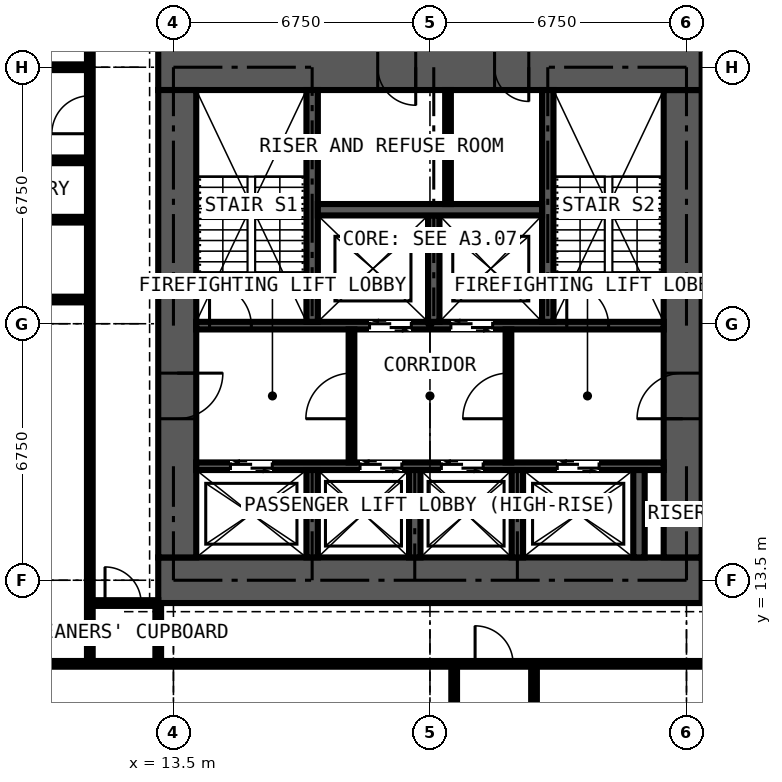
"""IFC4 building model, lengths in metres.
Left out: names, types, materials, properties, quantities, classifications, styles, units other than length and angle.
Written with IfcOpenShell. Run it as: python <this file> out.ifc"""

import sys

from ifc_helpers import new_model, si_unit, direction, frame, frame_2d, origin, place, context, subcontext, project, spatial, rectangle, extrude, element, fill, save


model = new_model("IFC4")
c1 = context("Model", 3, precision=1e-05, world=origin(), true_north=direction((0.0, 1.0)))
c2 = subcontext(c1, "Body", "Model", "MODEL_VIEW")
j1 = project(units=[si_unit("LENGTHUNIT", "METRE"), si_unit("PLANEANGLEUNIT", "RADIAN")], contexts=[c1])
p1 = place(None, origin())
s1 = spatial("IfcSite", under=j1, at=p1, CompositionType="ELEMENT")
p2 = place(p1, origin())
s2 = spatial("IfcBuilding", under=s1, at=p2, CompositionType="ELEMENT")
p3 = place(p2, frame((0.0, 0.0, 171.0)))
s3 = spatial("IfcBuildingStorey", under=s2, at=p3, CompositionType="ELEMENT", Elevation=171.0)
p4 = place(p3, frame((13.1, 13.5, 0.0), z_axis=(0.0, 0.0, 1.0), x_axis=(1.0, 0.0, 0.0)))
e1 = element("IfcWall", 1, at=p4, inside=s3, PredefinedType="SHEAR", context=c2, shape_type="SweptSolid", body=[
    extrude(rectangle(XDim=14.3, YDim=1.2, at=frame_2d((7.15, 0.0))), origin(), (0.0, 0.0, 1.0), 3.6),
])
p5 = place(p3, frame((26.9, 14.1, 0.0), z_axis=(0.0, 0.0, 1.0), x_axis=(0.0, 1.0, 0.0)))
e2 = element("IfcWall", 2, at=p5, inside=s3, PredefinedType="SHEAR", context=c2, shape_type="SweptSolid", body=[
    extrude(rectangle(XDim=12.3, YDim=1.0, at=frame_2d((6.15, 0.0))), origin(), (0.0, 0.0, 1.0), 3.6),
])
p6 = place(p5, frame((3.65, 0.0, 0.0)))
e3 = element("IfcOpeningElement", 3, at=p6, cuts=e2, PredefinedType="OPENING", context=c2, shape_type="SweptSolid", body=[
    extrude(rectangle(XDim=1.2, YDim=2.2, at=frame_2d((0.6, 1.1))), frame((0.0, 0.51, 0.0), z_axis=(0.0, -1.0, 0.0), x_axis=(1.0, 0.0, 0.0)), (0.0, 0.0, 1.0), 1.02),
])
p7 = place(p3, frame((27.4, 27.0, 0.0), z_axis=(0.0, 0.0, 1.0), x_axis=(-1.0, 0.0, 0.0)))
e4 = element("IfcWall", 4, at=p7, inside=s3, PredefinedType="SHEAR", context=c2, shape_type="SweptSolid", body=[
    extrude(rectangle(XDim=14.3, YDim=1.2, at=frame_2d((7.15, 0.0))), origin(), (0.0, 0.0, 1.0), 3.6),
])
p8 = place(p7, frame((4.55, 0.0, 0.0)))
e5 = element("IfcOpeningElement", 5, at=p8, cuts=e4, PredefinedType="OPENING", context=c2, shape_type="SweptSolid", body=[
    extrude(rectangle(XDim=0.9, YDim=2.2, at=frame_2d((0.45, 1.1))), frame((0.0, 0.61, 0.0), z_axis=(0.0, -1.0, 0.0), x_axis=(1.0, 0.0, 0.0)), (0.0, 0.0, 1.0), 1.22),
])
p9 = place(p7, frame((7.525, 0.0, 0.0)))
e6 = element("IfcOpeningElement", 6, at=p9, cuts=e4, PredefinedType="OPENING", context=c2, shape_type="SweptSolid", body=[
    extrude(rectangle(XDim=1.0, YDim=2.2, at=frame_2d((0.5, 1.1))), frame((0.0, 0.61, 0.0), z_axis=(0.0, -1.0, 0.0), x_axis=(1.0, 0.0, 0.0)), (0.0, 0.0, 1.0), 1.22),
])
p10 = place(p3, frame((13.6, 26.4, 0.0), z_axis=(0.0, 0.0, 1.0), x_axis=(0.0, -1.0, 0.0)))
e7 = element("IfcWall", 7, at=p10, inside=s3, PredefinedType="SHEAR", context=c2, shape_type="SweptSolid", body=[
    extrude(rectangle(XDim=12.3, YDim=1.0, at=frame_2d((6.15, 0.0))), origin(), (0.0, 0.0, 1.0), 3.6),
])
p11 = place(p10, frame((7.45, 0.0, 0.0)))
e8 = element("IfcOpeningElement", 8, at=p11, cuts=e7, PredefinedType="OPENING", context=c2, shape_type="SweptSolid", body=[
    extrude(rectangle(XDim=1.2, YDim=2.2, at=frame_2d((0.6, 1.1))), frame((0.0, 0.51, 0.0), z_axis=(0.0, -1.0, 0.0), x_axis=(1.0, 0.0, 0.0)), (0.0, 0.0, 1.0), 1.02),
])
p12 = place(p3, frame((14.1, 16.5, 0.0), z_axis=(0.0, 0.0, 1.0), x_axis=(1.0, 0.0, 0.0)))
e9 = element("IfcWall", 9, at=p12, inside=s3, PredefinedType="SHEAR", context=c2, shape_type="SweptSolid", body=[
    extrude(rectangle(XDim=12.3, YDim=0.2, at=frame_2d((6.15, 0.0))), origin(), (0.0, 0.0, 1.0), 3.6),
])
p13 = place(p12, frame((0.9, 0.0, 0.0)))
e10 = element("IfcOpeningElement", 10, at=p13, cuts=e9, PredefinedType="OPENING", context=c2, shape_type="SweptSolid", body=[
    extrude(rectangle(XDim=1.1, YDim=2.2, at=frame_2d((0.55, 1.1))), frame((0.0, 0.11, 0.0), z_axis=(0.0, -1.0, 0.0), x_axis=(1.0, 0.0, 0.0)), (0.0, 0.0, 1.0), 0.22),
])
p14 = place(p12, frame((4.31, 0.0, 0.0)))
e11 = element("IfcOpeningElement", 11, at=p14, cuts=e9, PredefinedType="OPENING", context=c2, shape_type="SweptSolid", body=[
    extrude(rectangle(XDim=1.1, YDim=2.2, at=frame_2d((0.55, 1.1))), frame((0.0, 0.11, 0.0), z_axis=(0.0, -1.0, 0.0), x_axis=(1.0, 0.0, 0.0)), (0.0, 0.0, 1.0), 0.22),
])
p15 = place(p12, frame((6.45, 0.0, 0.0)))
e12 = element("IfcOpeningElement", 12, at=p15, cuts=e9, PredefinedType="OPENING", context=c2, shape_type="SweptSolid", body=[
    extrude(rectangle(XDim=1.1, YDim=2.2, at=frame_2d((0.55, 1.1))), frame((0.0, 0.11, 0.0), z_axis=(0.0, -1.0, 0.0), x_axis=(1.0, 0.0, 0.0)), (0.0, 0.0, 1.0), 0.22),
])
p16 = place(p12, frame((9.5, 0.0, 0.0)))
e13 = element("IfcOpeningElement", 13, at=p16, cuts=e9, PredefinedType="OPENING", context=c2, shape_type="SweptSolid", body=[
    extrude(rectangle(XDim=1.1, YDim=2.2, at=frame_2d((0.55, 1.1))), frame((0.0, 0.11, 0.0), z_axis=(0.0, -1.0, 0.0), x_axis=(1.0, 0.0, 0.0)), (0.0, 0.0, 1.0), 0.22),
])
p17 = place(p3, frame((14.1, 20.2, 0.0), z_axis=(0.0, 0.0, 1.0), x_axis=(1.0, 0.0, 0.0)))
e14 = element("IfcWall", 14, at=p17, inside=s3, PredefinedType="SHEAR", context=c2, shape_type="SweptSolid", body=[
    extrude(rectangle(XDim=12.3, YDim=0.2, at=frame_2d((6.15, 0.0))), origin(), (0.0, 0.0, 1.0), 3.6),
])
p18 = place(p17, frame((4.56, 0.0, 0.0)))
e15 = element("IfcOpeningElement", 15, at=p18, cuts=e14, PredefinedType="OPENING", context=c2, shape_type="SweptSolid", body=[
    extrude(rectangle(XDim=1.1, YDim=2.2, at=frame_2d((0.55, 1.1))), frame((0.0, 0.11, 0.0), z_axis=(0.0, -1.0, 0.0), x_axis=(1.0, 0.0, 0.0)), (0.0, 0.0, 1.0), 0.22),
])
p19 = place(p17, frame((6.7, 0.0, 0.0)))
e16 = element("IfcOpeningElement", 16, at=p19, cuts=e14, PredefinedType="OPENING", context=c2, shape_type="SweptSolid", body=[
    extrude(rectangle(XDim=1.1, YDim=2.2, at=frame_2d((0.55, 1.1))), frame((0.0, 0.11, 0.0), z_axis=(0.0, -1.0, 0.0), x_axis=(1.0, 0.0, 0.0)), (0.0, 0.0, 1.0), 0.22),
])
p20 = place(p17, frame((0.35, 0.0, 0.0)))
e17 = element("IfcOpeningElement", 17, at=p20, cuts=e14, PredefinedType="OPENING", context=c2, shape_type="SweptSolid", body=[
    extrude(rectangle(XDim=1.1, YDim=2.2, at=frame_2d((0.55, 1.1))), frame((0.0, 0.11, 0.0), z_axis=(0.0, -1.0, 0.0), x_axis=(1.0, 0.0, 0.0)), (0.0, 0.0, 1.0), 0.22),
])
p21 = place(p17, frame((9.75, 0.0, 0.0)))
e18 = element("IfcOpeningElement", 18, at=p21, cuts=e14, PredefinedType="OPENING", context=c2, shape_type="SweptSolid", body=[
    extrude(rectangle(XDim=1.1, YDim=2.2, at=frame_2d((0.55, 1.1))), frame((0.0, 0.11, 0.0), z_axis=(0.0, -1.0, 0.0), x_axis=(1.0, 0.0, 0.0)), (0.0, 0.0, 1.0), 0.22),
])
for number, where, z_axis, x_axis in (
    (19, (17.15, 20.3, 0.0), (0.0, 0.0, 1.0), (0.0, 1.0, 0.0)),
    (20, (23.35, 20.3, 0.0), (0.0, 0.0, 1.0), (0.0, 1.0, 0.0)),
):
    element("IfcWall", number, at=place(p3, frame(where, z_axis=z_axis, x_axis=x_axis)), inside=s3, PredefinedType="SHEAR", context=c2, shape_type="SweptSolid", body=[
        extrude(rectangle(XDim=6.1, YDim=0.3, at=frame_2d((3.05, 0.0))), origin(), (0.0, 0.0, 1.0), 3.6),
    ])
p22 = place(p3, frame((20.35, 20.3, 0.0), z_axis=(0.0, 0.0, 1.0), x_axis=(0.0, 1.0, 0.0)))
e21 = element("IfcWall", 21, at=p22, inside=s3, PredefinedType="SHEAR", context=c2, shape_type="SweptSolid", body=[
    extrude(rectangle(XDim=2.8, YDim=0.3, at=frame_2d((1.4, 0.0))), origin(), (0.0, 0.0, 1.0), 3.6),
])
p23 = place(p3, frame((17.3, 23.25, 0.0), z_axis=(0.0, 0.0, 1.0), x_axis=(1.0, 0.0, 0.0)))
e22 = element("IfcWall", 22, at=p23, inside=s3, PredefinedType="SHEAR", context=c2, shape_type="SweptSolid", body=[
    extrude(rectangle(XDim=5.9, YDim=0.3, at=frame_2d((2.95, 0.0))), origin(), (0.0, 0.0, 1.0), 3.6),
])
for number, where, z_axis, x_axis in (
    (23, (17.15, 14.1, 0.0), (0.0, 0.0, 1.0), (0.0, 1.0, 0.0)),
    (24, (19.85, 14.1, 0.0), (0.0, 0.0, 1.0), (0.0, 1.0, 0.0)),
    (25, (22.55, 14.1, 0.0), (0.0, 0.0, 1.0), (0.0, 1.0, 0.0)),
    (26, (25.75, 14.1, 0.0), (0.0, 0.0, 1.0), (0.0, 1.0, 0.0)),
):
    element("IfcWall", number, at=place(p3, frame(where, z_axis=z_axis, x_axis=x_axis)), inside=s3, PredefinedType="SHEAR", context=c2, shape_type="SweptSolid", body=[
        extrude(rectangle(XDim=2.3, YDim=0.3, at=frame_2d((1.15, 0.0))), origin(), (0.0, 0.0, 1.0), 3.6),
    ])
p24 = place(p3, frame((18.185, 16.6, 0.0), z_axis=(0.0, 0.0, 1.0), x_axis=(0.0, 1.0, 0.0)))
e27 = element("IfcWall", 27, at=p24, inside=s3, PredefinedType="PARTITIONING", context=c2, shape_type="SweptSolid", body=[
    extrude(rectangle(XDim=3.5, YDim=0.15, at=frame_2d((1.75, 0.0))), origin(), (0.0, 0.0, 1.0), 3.375),
])
p25 = place(p24, frame((1.15, 0.0, 0.0)))
e28 = element("IfcOpeningElement", 28, at=p25, cuts=e27, PredefinedType="OPENING", context=c2, shape_type="SweptSolid", body=[
    extrude(rectangle(XDim=1.2, YDim=2.2, at=frame_2d((0.6, 1.1))), frame((0.0, 0.085, 0.0), z_axis=(0.0, -1.0, 0.0), x_axis=(1.0, 0.0, 0.0)), (0.0, 0.0, 1.0), 0.17),
])
p26 = place(p3, frame((22.315, 16.6, 0.0), z_axis=(0.0, 0.0, 1.0), x_axis=(0.0, 1.0, 0.0)))
e29 = element("IfcWall", 29, at=p26, inside=s3, PredefinedType="PARTITIONING", context=c2, shape_type="SweptSolid", body=[
    extrude(rectangle(XDim=3.5, YDim=0.15, at=frame_2d((1.75, 0.0))), origin(), (0.0, 0.0, 1.0), 3.375),
])
p27 = place(p26, frame((1.15, 0.0, 0.0)))
e30 = element("IfcOpeningElement", 30, at=p27, cuts=e29, PredefinedType="OPENING", context=c2, shape_type="SweptSolid", body=[
    extrude(rectangle(XDim=1.2, YDim=2.2, at=frame_2d((0.6, 1.1))), frame((0.0, 0.085, 0.0), z_axis=(0.0, -1.0, 0.0), x_axis=(1.0, 0.0, 0.0)), (0.0, 0.0, 1.0), 0.17),
])
p28 = place(p3, frame((20.725, 23.4, 0.0), z_axis=(0.0, 0.0, 1.0), x_axis=(0.0, 1.0, 0.0)))
e31 = element("IfcWall", 31, at=p28, inside=s3, PredefinedType="PARTITIONING", context=c2, shape_type="SweptSolid", body=[
    extrude(rectangle(XDim=3.0, YDim=0.15, at=frame_2d((1.5, 0.0))), origin(), (0.0, 0.0, 1.0), 3.375),
])
p29 = place(p3, frame((-0.734, 27.0, 0.0), z_axis=(0.0, 0.0, 1.0), x_axis=(1.0, 0.0, 0.0)))
e32 = element("IfcWall", 32, at=p29, inside=s3, PredefinedType="PARTITIONING", context=c2, shape_type="SweptSolid", body=[
    extrude(rectangle(XDim=12.034, YDim=0.15, at=frame_2d((6.017, 0.0))), origin(), (0.0, 0.0, 1.0), 2.806),
])
p30 = place(p29, frame((8.084, 0.0, 0.0)))
e33 = element("IfcOpeningElement", 33, at=p30, cuts=e32, PredefinedType="OPENING", context=c2, shape_type="SweptSolid", body=[
    extrude(rectangle(XDim=1.0, YDim=2.2, at=frame_2d((0.5, 1.1))), frame((0.0, 0.085, 0.0), z_axis=(0.0, -1.0, 0.0), x_axis=(1.0, 0.0, 0.0)), (0.0, 0.0, 1.0), 0.17),
])
p31 = place(p3, frame((5.65, 20.887, 0.0), z_axis=(0.0, 0.0, 1.0), x_axis=(1.0, 0.0, 0.0)))
e34 = element("IfcWall", 34, at=p31, inside=s3, PredefinedType="PARTITIONING", context=c2, shape_type="SweptSolid", body=[
    extrude(rectangle(XDim=5.65, YDim=0.15, at=frame_2d((2.825, 0.0))), origin(), (0.0, 0.0, 1.0), 3.375),
])
p32 = place(p3, frame((5.65, 22.988, 0.0), z_axis=(0.0, 0.0, 1.0), x_axis=(1.0, 0.0, 0.0)))
e35 = element("IfcWall", 35, at=p32, inside=s3, PredefinedType="PARTITIONING", context=c2, shape_type="SweptSolid", body=[
    extrude(rectangle(XDim=5.65, YDim=0.15, at=frame_2d((2.825, 0.0))), origin(), (0.0, 0.0, 1.0), 3.375),
])
p33 = place(p32, frame((2.35, 0.0, 0.0)))
e36 = element("IfcOpeningElement", 36, at=p33, cuts=e35, PredefinedType="OPENING", context=c2, shape_type="SweptSolid", body=[
    extrude(rectangle(XDim=0.95, YDim=2.2, at=frame_2d((0.475, 1.1))), frame((0.0, 0.085, 0.0), z_axis=(0.0, -1.0, 0.0), x_axis=(1.0, 0.0, 0.0)), (0.0, 0.0, 1.0), 0.17),
])
p34 = place(p3, frame((5.65, 24.55, 0.0), z_axis=(0.0, 0.0, 1.0), x_axis=(1.0, 0.0, 0.0)))
e37 = element("IfcWall", 37, at=p34, inside=s3, PredefinedType="PARTITIONING", context=c2, shape_type="SweptSolid", body=[
    extrude(rectangle(XDim=5.65, YDim=0.15, at=frame_2d((2.825, 0.0))), origin(), (0.0, 0.0, 1.0), 3.375),
])
p35 = place(p3, frame((10.125, 11.3, 0.0), z_axis=(0.0, 0.0, 1.0), x_axis=(1.0, 0.0, 0.0)))
e38 = element("IfcWall", 38, at=p35, inside=s3, PredefinedType="PARTITIONING", context=c2, shape_type="SweptSolid", body=[
    extrude(rectangle(XDim=21.475, YDim=0.15, at=frame_2d((10.738, 0.0))), origin(), (0.0, 0.0, 1.0), 3.375),
])
p36 = place(p35, frame((11.312, 0.0, 0.0)))
e39 = element("IfcOpeningElement", 39, at=p36, cuts=e38, PredefinedType="OPENING", context=c2, shape_type="SweptSolid", body=[
    extrude(rectangle(XDim=1.0, YDim=2.2, at=frame_2d((0.5, 1.1))), frame((0.0, 0.085, 0.0), z_axis=(0.0, -1.0, 0.0), x_axis=(1.0, 0.0, 0.0)), (0.0, 0.0, 1.0), 0.17),
])
p37 = place(p3, frame((11.3, 11.3, 0.0), z_axis=(0.0, 0.0, 1.0), x_axis=(0.0, 1.0, 0.0)))
e40 = element("IfcWall", 40, at=p37, inside=s3, PredefinedType="PARTITIONING", context=c2, shape_type="SweptSolid", body=[
    extrude(rectangle(XDim=19.075, YDim=0.15, at=frame_2d((9.538, 0.0))), origin(), (0.0, 0.0, 1.0), 3.375),
])
p38 = place(p37, frame((13.95, 0.0, 0.0)))
e41 = element("IfcOpeningElement", 41, at=p38, cuts=e40, PredefinedType="OPENING", context=c2, shape_type="SweptSolid", body=[
    extrude(rectangle(XDim=1.0, YDim=2.2, at=frame_2d((0.5, 1.1))), frame((0.0, 0.085, 0.0), z_axis=(0.0, -1.0, 0.0), x_axis=(1.0, 0.0, 0.0)), (0.0, 0.0, 1.0), 0.17),
])
p39 = place(p3, frame((11.3, 12.9, 0.0), z_axis=(0.0, 0.0, 1.0), x_axis=(1.0, 0.0, 0.0)))
e42 = element("IfcWall", 42, at=p39, inside=s3, PredefinedType="PARTITIONING", context=c2, shape_type="SweptSolid", body=[
    extrude(rectangle(XDim=1.8, YDim=0.15, at=frame_2d((0.9, 0.0))), origin(), (0.0, 0.0, 1.0), 2.806),
])
p40 = place(p39, frame((0.4, 0.0, 0.0)))
e43 = element("IfcOpeningElement", 43, at=p40, cuts=e42, PredefinedType="OPENING", context=c2, shape_type="SweptSolid", body=[
    extrude(rectangle(XDim=0.95, YDim=2.2, at=frame_2d((0.475, 1.1))), frame((0.0, 0.085, 0.0), z_axis=(0.0, -1.0, 0.0), x_axis=(1.0, 0.0, 0.0)), (0.0, 0.0, 1.0), 0.17),
])
p41 = place(p3, frame((13.1, 11.3, 0.0), z_axis=(0.0, 0.0, 1.0), x_axis=(0.0, 1.0, 0.0)))
e44 = element("IfcWall", 44, at=p41, inside=s3, PredefinedType="PARTITIONING", context=c2, shape_type="SweptSolid", body=[
    extrude(rectangle(XDim=1.6, YDim=0.15, at=frame_2d((0.8, 0.0))), origin(), (0.0, 0.0, 1.0), 3.375),
])
for number, where, z_axis, x_axis in (
    (45, (20.887, 5.65, 0.0), (0.0, 0.0, 1.0), (0.0, 1.0, 0.0)),
    (46, (22.988, 5.65, 0.0), (0.0, 0.0, 1.0), (0.0, 1.0, 0.0)),
):
    element("IfcWall", number, at=place(p3, frame(where, z_axis=z_axis, x_axis=x_axis)), inside=s3, PredefinedType="PARTITIONING", context=c2, shape_type="SweptSolid", body=[
        extrude(rectangle(XDim=5.65, YDim=0.15, at=frame_2d((2.825, 0.0))), origin(), (0.0, 0.0, 1.0), 3.375),
    ])
p42 = place(p13, origin())
e47 = element("IfcDoor", 47, at=p42, inside=s3, OperationType="DOUBLE_DOOR_SLIDING", PredefinedType="DOOR", context=c2, shape_type="SweptSolid", body=[
    extrude(rectangle(XDim=1.1, YDim=2.2, at=frame_2d((0.55, 1.1))), frame((0.0, 0.025, 0.0), z_axis=(0.0, -1.0, 0.0), x_axis=(1.0, 0.0, 0.0)), (0.0, 0.0, 1.0), 0.05),
])
fill(e10, e47)
p43 = place(p14, origin())
e48 = element("IfcDoor", 48, at=p43, inside=s3, OperationType="DOUBLE_DOOR_SLIDING", PredefinedType="DOOR", context=c2, shape_type="SweptSolid", body=[
    extrude(rectangle(XDim=1.1, YDim=2.2, at=frame_2d((0.55, 1.1))), frame((0.0, 0.025, 0.0), z_axis=(0.0, -1.0, 0.0), x_axis=(1.0, 0.0, 0.0)), (0.0, 0.0, 1.0), 0.05),
])
fill(e11, e48)
p44 = place(p15, origin())
e49 = element("IfcDoor", 49, at=p44, inside=s3, OperationType="DOUBLE_DOOR_SLIDING", PredefinedType="DOOR", context=c2, shape_type="SweptSolid", body=[
    extrude(rectangle(XDim=1.1, YDim=2.2, at=frame_2d((0.55, 1.1))), frame((0.0, 0.025, 0.0), z_axis=(0.0, -1.0, 0.0), x_axis=(1.0, 0.0, 0.0)), (0.0, 0.0, 1.0), 0.05),
])
fill(e12, e49)
p45 = place(p16, origin())
e50 = element("IfcDoor", 50, at=p45, inside=s3, OperationType="DOUBLE_DOOR_SLIDING", PredefinedType="DOOR", context=c2, shape_type="SweptSolid", body=[
    extrude(rectangle(XDim=1.1, YDim=2.2, at=frame_2d((0.55, 1.1))), frame((0.0, 0.025, 0.0), z_axis=(0.0, -1.0, 0.0), x_axis=(1.0, 0.0, 0.0)), (0.0, 0.0, 1.0), 0.05),
])
fill(e13, e50)
p46 = place(p18, origin())
e51 = element("IfcDoor", 51, at=p46, inside=s3, OperationType="DOUBLE_DOOR_SLIDING", PredefinedType="DOOR", context=c2, shape_type="SweptSolid", body=[
    extrude(rectangle(XDim=1.1, YDim=2.2, at=frame_2d((0.55, 1.1))), frame((0.0, 0.025, 0.0), z_axis=(0.0, -1.0, 0.0), x_axis=(1.0, 0.0, 0.0)), (0.0, 0.0, 1.0), 0.05),
])
fill(e15, e51)
p47 = place(p19, origin())
e52 = element("IfcDoor", 52, at=p47, inside=s3, OperationType="DOUBLE_DOOR_SLIDING", PredefinedType="DOOR", context=c2, shape_type="SweptSolid", body=[
    extrude(rectangle(XDim=1.1, YDim=2.2, at=frame_2d((0.55, 1.1))), frame((0.0, 0.025, 0.0), z_axis=(0.0, -1.0, 0.0), x_axis=(1.0, 0.0, 0.0)), (0.0, 0.0, 1.0), 0.05),
])
fill(e16, e52)
p48 = place(p11, origin())
e53 = element("IfcDoor", 53, at=p48, inside=s3, OperationType="DOUBLE_DOOR_SINGLE_SWING", PredefinedType="DOOR", context=c2, shape_type="SweptSolid", body=[
    extrude(rectangle(XDim=1.2, YDim=2.2, at=frame_2d((0.6, 1.1))), frame((0.0, 0.025, 0.0), z_axis=(0.0, -1.0, 0.0), x_axis=(1.0, 0.0, 0.0)), (0.0, 0.0, 1.0), 0.05),
])
fill(e8, e53)
p49 = place(p6, origin())
e54 = element("IfcDoor", 54, at=p49, inside=s3, OperationType="DOUBLE_DOOR_SINGLE_SWING", PredefinedType="DOOR", context=c2, shape_type="SweptSolid", body=[
    extrude(rectangle(XDim=1.2, YDim=2.2, at=frame_2d((0.6, 1.1))), frame((0.0, 0.025, 0.0), z_axis=(0.0, -1.0, 0.0), x_axis=(1.0, 0.0, 0.0)), (0.0, 0.0, 1.0), 0.05),
])
fill(e3, e54)
p50 = place(p25, origin())
e55 = element("IfcDoor", 55, at=p50, inside=s3, OperationType="DOUBLE_DOOR_SINGLE_SWING", PredefinedType="DOOR", context=c2, shape_type="SweptSolid", body=[
    extrude(rectangle(XDim=1.2, YDim=2.2, at=frame_2d((0.6, 1.1))), frame((0.0, 0.025, 0.0), z_axis=(0.0, -1.0, 0.0), x_axis=(1.0, 0.0, 0.0)), (0.0, 0.0, 1.0), 0.05),
])
fill(e28, e55)
p51 = place(p27, origin())
e56 = element("IfcDoor", 56, at=p51, inside=s3, OperationType="DOUBLE_DOOR_SINGLE_SWING", PredefinedType="DOOR", context=c2, shape_type="SweptSolid", body=[
    extrude(rectangle(XDim=1.2, YDim=2.2, at=frame_2d((0.6, 1.1))), frame((0.0, 0.025, 0.0), z_axis=(0.0, -1.0, 0.0), x_axis=(1.0, 0.0, 0.0)), (0.0, 0.0, 1.0), 0.05),
])
fill(e30, e56)
p52 = place(p8, origin())
e57 = element("IfcDoor", 57, at=p52, inside=s3, OperationType="SINGLE_SWING_LEFT", PredefinedType="DOOR", context=c2, shape_type="SweptSolid", body=[
    extrude(rectangle(XDim=0.9, YDim=2.2, at=frame_2d((0.45, 1.1))), frame((0.0, 0.4, 0.0), z_axis=(0.0, -1.0, 0.0), x_axis=(1.0, 0.0, 0.0)), (0.0, 0.0, 1.0), 0.8),
])
fill(e5, e57)
p53 = place(p9, origin())
e58 = element("IfcDoor", 58, at=p53, inside=s3, OperationType="SINGLE_SWING_LEFT", PredefinedType="DOOR", context=c2, shape_type="SweptSolid", body=[
    extrude(rectangle(XDim=1.0, YDim=2.2, at=frame_2d((0.5, 1.1))), frame((0.0, 0.025, 0.0), z_axis=(0.0, -1.0, 0.0), x_axis=(1.0, 0.0, 0.0)), (0.0, 0.0, 1.0), 0.05),
])
fill(e6, e58)
p54 = place(p20, origin())
e59 = element("IfcDoor", 59, at=p54, inside=s3, OperationType="SINGLE_SWING_LEFT", PredefinedType="DOOR", context=c2, shape_type="SweptSolid", body=[
    extrude(rectangle(XDim=1.1, YDim=2.2, at=frame_2d((0.55, 1.1))), frame((0.0, 0.025, 0.0), z_axis=(0.0, -1.0, 0.0), x_axis=(1.0, 0.0, 0.0)), (0.0, 0.0, 1.0), 0.05),
])
fill(e17, e59)
p55 = place(p21, origin())
e60 = element("IfcDoor", 60, at=p55, inside=s3, OperationType="SINGLE_SWING_LEFT", PredefinedType="DOOR", context=c2, shape_type="SweptSolid", body=[
    extrude(rectangle(XDim=1.1, YDim=2.2, at=frame_2d((0.55, 1.1))), frame((0.0, 0.025, 0.0), z_axis=(0.0, -1.0, 0.0), x_axis=(1.0, 0.0, 0.0)), (0.0, 0.0, 1.0), 0.05),
])
fill(e18, e60)
p56 = place(p40, origin())
e61 = element("IfcDoor", 61, at=p56, inside=s3, OperationType="SINGLE_SWING_LEFT", PredefinedType="DOOR", context=c2, shape_type="SweptSolid", body=[
    extrude(rectangle(XDim=0.95, YDim=2.2, at=frame_2d((0.475, 1.1))), frame((0.0, 0.025, 0.0), z_axis=(0.0, -1.0, 0.0), x_axis=(1.0, 0.0, 0.0)), (0.0, 0.0, 1.0), 0.05),
])
fill(e43, e61)
p57 = place(p36, origin())
e62 = element("IfcDoor", 62, at=p57, inside=s3, OperationType="SINGLE_SWING_LEFT", PredefinedType="DOOR", context=c2, shape_type="SweptSolid", body=[
    extrude(rectangle(XDim=1.0, YDim=2.2, at=frame_2d((0.5, 1.1))), frame((0.0, 0.025, 0.0), z_axis=(0.0, -1.0, 0.0), x_axis=(1.0, 0.0, 0.0)), (0.0, 0.0, 1.0), 0.05),
])
fill(e39, e62)
p58 = place(p38, origin())
e63 = element("IfcDoor", 63, at=p58, inside=s3, OperationType="SINGLE_SWING_LEFT", PredefinedType="DOOR", context=c2, shape_type="SweptSolid", body=[
    extrude(rectangle(XDim=1.0, YDim=2.2, at=frame_2d((0.5, 1.1))), frame((0.0, 0.025, 0.0), z_axis=(0.0, -1.0, 0.0), x_axis=(1.0, 0.0, 0.0)), (0.0, 0.0, 1.0), 0.05),
])
fill(e41, e63)
save(model, sys.argv[1])
